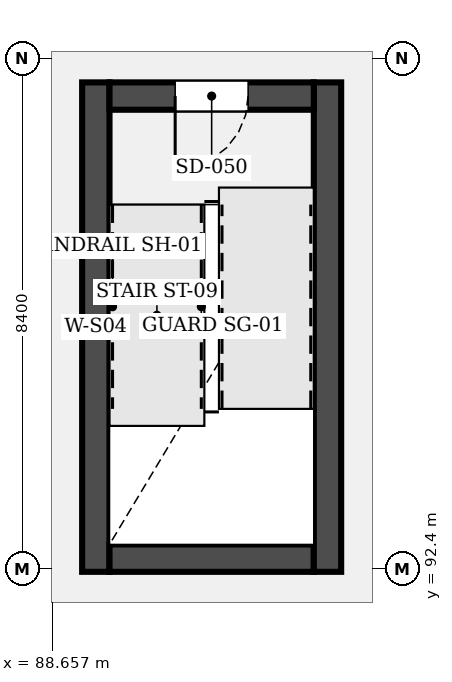
"""IFC4 building model, lengths in metres.
Left out: names, types, materials, properties, quantities, classifications, styles, units other than length and angle.
Written with IfcOpenShell. Run it as: python <this file> out.ifc"""

import sys

from ifc_helpers import new_model, si_unit, direction, frame, frame_2d, origin, place, context, subcontext, project, spatial, rectangle, extrude, element, fill, save


model = new_model("IFC4")
c1 = context("Model", 3, precision=1e-05, world=origin(), true_north=direction((0.0, 1.0)))
c2 = subcontext(c1, "Body", "Model", "MODEL_VIEW")
j1 = project(units=[si_unit("LENGTHUNIT", "METRE"), si_unit("PLANEANGLEUNIT", "RADIAN")], contexts=[c1])
p1 = place(None, origin())
s1 = spatial("IfcSite", under=j1, at=p1, CompositionType="ELEMENT")
p2 = place(p1, origin())
s2 = spatial("IfcBuilding", under=s1, at=p2, CompositionType="ELEMENT")
p3 = place(p2, frame((0.0, 0.0, 5.1)))
s3 = spatial("IfcBuildingStorey", under=s2, at=p3, CompositionType="ELEMENT", Elevation=5.1)
p4 = place(p3, frame((89.375, 100.4, 0.0), z_axis=(0.0, 0.0, 1.0), x_axis=(0.0, -1.0, 0.0)))
e1 = element("IfcWall", 1, at=p4, inside=s3, PredefinedType="SHEAR", context=c2, shape_type="SweptSolid", body=[
    extrude(rectangle(XDim=8.05, YDim=0.45, at=frame_2d((4.025, 0.0))), origin(), (0.0, 0.0, 1.0), 4.8),
])
p5 = place(p3, frame((89.6, 92.575, 0.0), z_axis=(0.0, 0.0, 1.0), x_axis=(1.0, 0.0, 0.0)))
e2 = element("IfcWall", 2, at=p5, inside=s3, PredefinedType="SHEAR", context=c2, shape_type="SweptSolid", body=[
    extrude(rectangle(XDim=3.36, YDim=0.45, at=frame_2d((1.68, 0.0))), origin(), (0.0, 0.0, 1.0), 4.8),
])
p6 = place(p3, frame((93.185, 92.35, 0.0), z_axis=(0.0, 0.0, 1.0), x_axis=(0.0, 1.0, 0.0)))
e3 = element("IfcWall", 3, at=p6, inside=s3, PredefinedType="SHEAR", context=c2, shape_type="SweptSolid", body=[
    extrude(rectangle(XDim=8.05, YDim=0.45, at=frame_2d((4.025, 0.0))), origin(), (0.0, 0.0, 1.0), 4.8),
])
p7 = place(p3, frame((92.96, 100.175, 0.0), z_axis=(0.0, 0.0, 1.0), x_axis=(-1.0, 0.0, 0.0)))
e4 = element("IfcWall", 4, at=p7, inside=s3, PredefinedType="SHEAR", context=c2, shape_type="SweptSolid", body=[
    extrude(rectangle(XDim=3.36, YDim=0.45, at=frame_2d((1.68, 0.0))), origin(), (0.0, 0.0, 1.0), 4.8),
])
p8 = place(p7, frame((1.08, 0.0, 0.0)))
e5 = element("IfcOpeningElement", 5, at=p8, cuts=e4, PredefinedType="OPENING", context=c2, shape_type="SweptSolid", body=[
    extrude(rectangle(XDim=1.2, YDim=2.2, at=frame_2d((0.6, 1.1))), frame((0.0, 0.235, 0.0), z_axis=(0.0, -1.0, 0.0), x_axis=(1.0, 0.0, 0.0)), (0.0, 0.0, 1.0), 0.47),
])
p9 = place(p8, origin())
e6 = element("IfcDoor", 6, at=p9, inside=s3, OperationType="SINGLE_SWING_RIGHT", PredefinedType="DOOR", context=c2, shape_type="SweptSolid", body=[
    extrude(rectangle(XDim=1.2, YDim=2.2, at=frame_2d((0.6, 1.1))), frame((0.0, 0.025, 0.0), z_axis=(0.0, -1.0, 0.0), x_axis=(1.0, 0.0, 0.0)), (0.0, 0.0, 1.0), 0.05),
])
fill(e5, e6)
save(model, sys.argv[1])
